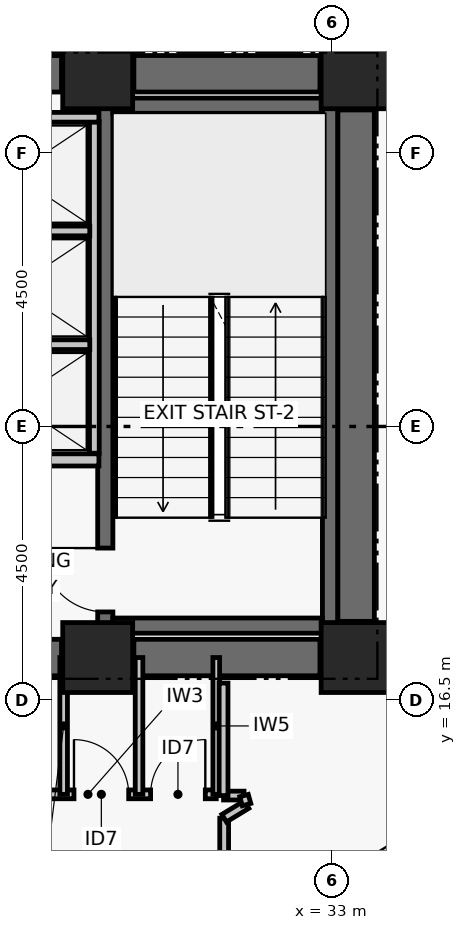
"""IFC4 building model, lengths in metres.
Left out: names, types, materials, properties, quantities, classifications, styles, units other than length and angle.
Written with IfcOpenShell. Run it as: python <this file> out.ifc"""

import sys

from ifc_helpers import new_model, si_unit, direction, frame, frame_2d, origin, origin_2d, place, context, subcontext, project, spatial, rectangle, extrude, element, fill, save


model = new_model("IFC4")
c1 = context("Model", 3, precision=1e-05, world=origin(), true_north=direction((0.0, 1.0)))
c2 = subcontext(c1, "Body", "Model", "MODEL_VIEW")
j1 = project(units=[si_unit("LENGTHUNIT", "METRE"), si_unit("PLANEANGLEUNIT", "RADIAN")], contexts=[c1])
p1 = place(None, origin())
s1 = spatial("IfcSite", under=j1, at=p1, CompositionType="ELEMENT")
p2 = place(p1, origin())
s2 = spatial("IfcBuilding", under=s1, at=p2, CompositionType="ELEMENT")
p3 = place(p2, frame((0.0, 0.0, 42.48)))
s3 = spatial("IfcBuildingStorey", under=s2, at=p3, CompositionType="ELEMENT", Elevation=42.48)
for number, where, z_axis, x_axis in (
    (1, (29.15, 17.2, 0.0), (0.0, 0.0, 1.0), (1.0, 0.0, 0.0)),
    (2, (33.4, 17.2, 0.0), (0.0, 0.0, 1.0), (1.0, 0.0, 0.0)),
    (3, (29.15, 26.8, 0.0), (0.0, 0.0, 1.0), (1.0, 0.0, 0.0)),
    (4, (33.4, 26.8, 0.0), (0.0, 0.0, 1.0), (1.0, 0.0, 0.0)),
):
    element("IfcColumn", number, at=place(p3, frame(where, z_axis=z_axis, x_axis=x_axis)), inside=s3, PredefinedType="COLUMN", context=c2, shape_type="SweptSolid", body=[
        extrude(rectangle(XDim=1.15, YDim=1.15, at=origin_2d()), origin(), (0.0, 0.0, 1.0), 3.72),
    ])
p4 = place(p3, frame((26.85, 17.2, 0.0), z_axis=(0.0, 0.0, 1.0), x_axis=(1.0, 0.0, 0.0)))
e5 = element("IfcWall", 5, at=p4, inside=s3, PredefinedType="SHEAR", context=c2, shape_type="SweptSolid", body=[
    extrude(rectangle(XDim=1.705, YDim=0.6, at=frame_2d((0.853, 0.0))), origin(), (0.0, 0.0, 1.0), 3.47),
])
p5 = place(p3, frame((29.745, 17.2, 0.0), z_axis=(0.0, 0.0, 1.0), x_axis=(1.0, 0.0, 0.0)))
e6 = element("IfcWall", 6, at=p5, inside=s3, PredefinedType="SHEAR", context=c2, shape_type="SweptSolid", body=[
    extrude(rectangle(XDim=3.06, YDim=0.6, at=frame_2d((1.53, 0.0))), origin(), (0.0, 0.0, 1.0), 3.47),
])
p6 = place(p3, frame((26.85, 26.8, 0.0), z_axis=(0.0, 0.0, 1.0), x_axis=(1.0, 0.0, 0.0)))
e7 = element("IfcWall", 7, at=p6, inside=s3, PredefinedType="SHEAR", context=c2, shape_type="SweptSolid", body=[
    extrude(rectangle(XDim=1.705, YDim=0.6, at=frame_2d((0.853, 0.0))), origin(), (0.0, 0.0, 1.0), 3.47),
])
p7 = place(p3, frame((29.745, 26.8, 0.0), z_axis=(0.0, 0.0, 1.0), x_axis=(1.0, 0.0, 0.0)))
e8 = element("IfcWall", 8, at=p7, inside=s3, PredefinedType="SHEAR", context=c2, shape_type="SweptSolid", body=[
    extrude(rectangle(XDim=3.06, YDim=0.6, at=frame_2d((1.53, 0.0))), origin(), (0.0, 0.0, 1.0), 3.47),
])
p8 = place(p3, frame((33.4, 17.795, 0.0), z_axis=(0.0, 0.0, 1.0), x_axis=(0.0, 1.0, 0.0)))
e9 = element("IfcWall", 9, at=p8, inside=s3, PredefinedType="SHEAR", context=c2, shape_type="SweptSolid", body=[
    extrude(rectangle(XDim=8.41, YDim=0.6, at=frame_2d((4.205, 0.0))), origin(), (0.0, 0.0, 1.0), 3.47),
])
p9 = place(p3, frame((29.275, 17.6, 0.0), z_axis=(0.0, 0.0, 1.0), x_axis=(0.0, 1.0, 0.0)))
e10 = element("IfcWall", 10, at=p9, inside=s3, PredefinedType="SHEAR", context=c2, shape_type="SweptSolid", body=[
    extrude(rectangle(XDim=8.8, YDim=0.25, at=frame_2d((4.4, 0.0))), origin(), (0.0, 0.0, 1.0), 3.47),
])
p10 = place(p9, frame((0.35, 0.0, 0.0)))
e11 = element("IfcOpeningElement", 11, at=p10, cuts=e10, PredefinedType="OPENING", context=c2, shape_type="SweptSolid", body=[
    extrude(rectangle(XDim=1.05, YDim=2.08, at=frame_2d((0.525, 1.04))), frame((0.0, 0.135, 0.0), z_axis=(0.0, -1.0, 0.0), x_axis=(1.0, 0.0, 0.0)), (0.0, 0.0, 1.0), 0.27),
])
p11 = place(p3, frame((32.971, 17.6, 0.0), z_axis=(0.0, 0.0, 1.0), x_axis=(0.0, 1.0, 0.0)))
e12 = element("IfcWall", 12, at=p11, inside=s3, PredefinedType="SHEAR", context=c2, shape_type="SweptSolid", body=[
    extrude(rectangle(XDim=8.8, YDim=0.25, at=frame_2d((4.4, 0.0))), origin(), (0.0, 0.0, 1.0), 3.47),
])
for number, where, z_axis, x_axis in (
    (13, (29.4, 17.725, 0.0), (0.0, 0.0, 1.0), (1.0, 0.0, 0.0)),
    (14, (29.4, 26.275, 0.0), (0.0, 0.0, 1.0), (1.0, 0.0, 0.0)),
):
    element("IfcWall", number, at=place(p3, frame(where, z_axis=z_axis, x_axis=x_axis)), inside=s3, PredefinedType="SHEAR", context=c2, shape_type="SweptSolid", body=[
        extrude(rectangle(XDim=3.446, YDim=0.25, at=frame_2d((1.723, 0.0))), origin(), (0.0, 0.0, 1.0), 3.47),
    ])
p12 = place(p3, frame((26.37, 20.45, 0.0), z_axis=(0.0, 0.0, 1.0), x_axis=(1.0, 0.0, 0.0)))
e15 = element("IfcWall", 15, at=p12, inside=s3, PredefinedType="PARTITIONING", context=c2, shape_type="SweptSolid", body=[
    extrude(rectangle(XDim=2.8, YDim=0.2, at=frame_2d((1.4, 0.0))), origin(), (0.0, 0.0, 1.0), 3.47),
])
p13 = place(p12, frame((0.78, 0.0, 0.0)))
e16 = element("IfcOpeningElement", 16, at=p13, cuts=e15, PredefinedType="OPENING", context=c2, shape_type="SweptSolid", body=[
    extrude(rectangle(XDim=1.1, YDim=2.08, at=frame_2d((0.55, 1.04))), frame((0.0, 0.11, 0.0), z_axis=(0.0, -1.0, 0.0), x_axis=(1.0, 0.0, 0.0)), (0.0, 0.0, 1.0), 0.22),
])
p14 = place(p3, frame((29.095, 20.56, 0.0), z_axis=(0.0, 0.0, 1.0), x_axis=(0.0, 1.0, 0.0)))
e17 = element("IfcWall", 17, at=p14, inside=s3, PredefinedType="PARTITIONING", context=c2, shape_type="SweptSolid", body=[
    extrude(rectangle(XDim=5.45, YDim=0.16, at=frame_2d((2.725, 0.0))), origin(), (0.0, 0.0, 1.0), 3.47),
])
p15 = place(p3, frame((26.37, 22.345, 0.0), z_axis=(0.0, 0.0, 1.0), x_axis=(1.0, 0.0, 0.0)))
e18 = element("IfcWall", 18, at=p15, inside=s3, PredefinedType="PARTITIONING", context=c2, shape_type="SweptSolid", body=[
    extrude(rectangle(XDim=2.65, YDim=0.16, at=frame_2d((1.325, 0.0))), origin(), (0.0, 0.0, 1.0), 3.47),
])
p16 = place(p3, frame((26.53, 24.215, 0.0), z_axis=(0.0, 0.0, 1.0), x_axis=(1.0, 0.0, 0.0)))
e19 = element("IfcWall", 19, at=p16, inside=s3, PredefinedType="PARTITIONING", context=c2, shape_type="SweptSolid", body=[
    extrude(rectangle(XDim=2.49, YDim=0.16, at=frame_2d((1.245, 0.0))), origin(), (0.0, 0.0, 1.0), 3.47),
])
p17 = place(p3, frame((26.34, 26.085, 0.0), z_axis=(0.0, 0.0, 1.0), x_axis=(1.0, 0.0, 0.0)))
e20 = element("IfcWall", 20, at=p17, inside=s3, PredefinedType="PARTITIONING", context=c2, shape_type="SweptSolid", body=[
    extrude(rectangle(XDim=2.83, YDim=0.16, at=frame_2d((1.415, 0.0))), origin(), (0.0, 0.0, 1.0), 3.47),
])
p18 = place(p3, frame((26.88, 14.95, 0.0), z_axis=(0.0, 0.0, 1.0), x_axis=(1.0, 0.0, 0.0)))
e21 = element("IfcWall", 21, at=p18, inside=s3, PredefinedType="PARTITIONING", context=c2, shape_type="SweptSolid", body=[
    extrude(rectangle(XDim=4.22, YDim=0.145, at=frame_2d((2.11, 0.0))), origin(), (0.0, 0.0, 1.0), 3.0),
])
p19 = place(p18, frame((0.39, 0.0, 0.0)))
e22 = element("IfcOpeningElement", 22, at=p19, cuts=e21, PredefinedType="OPENING", context=c2, shape_type="SweptSolid", body=[
    extrude(rectangle(XDim=0.92, YDim=2.05, at=frame_2d((0.46, 1.025))), frame((0.0, 0.083, 0.0), z_axis=(0.0, -1.0, 0.0), x_axis=(1.0, 0.0, 0.0)), (0.0, 0.0, 1.0), 0.165),
])
p20 = place(p18, frame((1.88, 0.0, 0.0)))
e23 = element("IfcOpeningElement", 23, at=p20, cuts=e21, PredefinedType="OPENING", context=c2, shape_type="SweptSolid", body=[
    extrude(rectangle(XDim=0.9, YDim=2.02, at=frame_2d((0.45, 1.01))), frame((0.0, 0.083, 0.0), z_axis=(0.0, -1.0, 0.0), x_axis=(1.0, 0.0, 0.0)), (0.0, 0.0, 1.0), 0.165),
])
p21 = place(p18, frame((3.14, 0.0, 0.0)))
e24 = element("IfcOpeningElement", 24, at=p21, cuts=e21, PredefinedType="OPENING", context=c2, shape_type="SweptSolid", body=[
    extrude(rectangle(XDim=0.9, YDim=2.02, at=frame_2d((0.45, 1.01))), frame((0.0, 0.083, 0.0), z_axis=(0.0, -1.0, 0.0), x_axis=(1.0, 0.0, 0.0)), (0.0, 0.0, 1.0), 0.165),
])
for number, where, z_axis, x_axis in (
    (25, (28.59, 14.95, 0.0), (0.0, 0.0, 1.0), (0.0, 1.0, 0.0)),
    (26, (29.83, 14.95, 0.0), (0.0, 0.0, 1.0), (0.0, 1.0, 0.0)),
):
    element("IfcWall", number, at=place(p3, frame(where, z_axis=z_axis, x_axis=x_axis)), inside=s3, PredefinedType="PARTITIONING", context=c2, shape_type="SweptSolid", body=[
        extrude(rectangle(XDim=2.25, YDim=0.125, at=frame_2d((1.125, 0.0))), origin(), (0.0, 0.0, 1.0), 2.6),
    ])
p22 = place(p3, frame((31.1, 14.95, 0.0), z_axis=(0.0, 0.0, 1.0), x_axis=(0.0, 1.0, 0.0)))
e27 = element("IfcWall", 27, at=p22, inside=s3, PredefinedType="PARTITIONING", context=c2, shape_type="SweptSolid", body=[
    extrude(rectangle(XDim=2.25, YDim=0.11, at=frame_2d((1.125, 0.0))), origin(), (0.0, 0.0, 1.0), 2.6),
])
p23 = place(p3, frame((31.23, 13.29, 0.0), z_axis=(0.0, 0.0, 1.0), x_axis=(0.0, 1.0, 0.0)))
e28 = element("IfcWall", 28, at=p23, inside=s3, PredefinedType="PARTITIONING", context=c2, shape_type="SweptSolid", body=[
    extrude(rectangle(XDim=1.268, YDim=0.145, at=frame_2d((0.634, 0.0))), origin(), (0.0, 0.0, 1.0), 2.85),
])
p24 = place(p3, frame((31.23, 14.558, 0.0), z_axis=(0.0, 0.0, 1.0), x_axis=(0.854931196424, 0.518741408971, 0.0)))
e29 = element("IfcWall", 29, at=p24, inside=s3, PredefinedType="PARTITIONING", context=c2, shape_type="SweptSolid", body=[
    extrude(rectangle(XDim=0.431, YDim=0.145, at=frame_2d((0.215, 0.0))), origin(), (0.0, 0.0, 1.0), 3.0),
])
p25 = place(p3, frame((31.557, 14.93, 0.0), z_axis=(0.0, 0.0, 1.0), x_axis=(-1.0, 0.0, 0.0)))
e30 = element("IfcWall", 30, at=p25, inside=s3, PredefinedType="PARTITIONING", context=c2, shape_type="SweptSolid", body=[
    extrude(rectangle(XDim=0.337, YDim=0.145, at=frame_2d((0.168, 0.0))), origin(), (0.0, 0.0, 1.0), 3.0),
])
p26 = place(p3, frame((31.22, 14.93, 0.0), z_axis=(0.0, 0.0, 1.0), x_axis=(0.0, 1.0, 0.0)))
e31 = element("IfcWall", 31, at=p26, inside=s3, PredefinedType="PARTITIONING", context=c2, shape_type="SweptSolid", body=[
    extrude(rectangle(XDim=1.85, YDim=0.145, at=frame_2d((0.925, 0.0))), origin(), (0.0, 0.0, 1.0), 2.6),
])
p27 = place(p3, frame((33.74, 27.22, 0.0), z_axis=(0.0, 0.0, 1.0), x_axis=(-1.0, 0.0, 0.0)))
e32 = element("IfcWall", 32, at=p27, inside=s3, PredefinedType="PARTITIONING", context=c2, shape_type="SweptSolid", body=[
    extrude(rectangle(XDim=0.86, YDim=0.145, at=frame_2d((0.43, 0.0))), origin(), (0.0, 0.0, 1.0), 2.6),
])
p28 = place(p3, frame((31.598, 14.781, 0.0), z_axis=(0.0, 0.0, 1.0), x_axis=(-0.269277388617, 0.963062660464, 0.0)))
e33 = element("IfcWall", 33, at=p28, inside=s3, PredefinedType="PARTITIONING", context=c2, shape_type="SweptSolid", body=[
    extrude(rectangle(XDim=0.154, YDim=0.145, at=frame_2d((0.077, 0.0))), origin(), (0.0, 0.0, 1.0), 3.0),
])
p29 = place(p10, origin())
e34 = element("IfcDoor", 34, at=p29, inside=s3, OperationType="SINGLE_SWING_RIGHT", PredefinedType="DOOR", context=c2, shape_type="SweptSolid", body=[
    extrude(rectangle(XDim=1.05, YDim=2.08, at=frame_2d((0.525, 1.04))), frame((0.0, 0.025, 0.0), z_axis=(0.0, -1.0, 0.0), x_axis=(1.0, 0.0, 0.0)), (0.0, 0.0, 1.0), 0.05),
])
fill(e11, e34)
p30 = place(p20, origin())
e35 = element("IfcDoor", 35, at=p30, inside=s3, OperationType="SINGLE_SWING_LEFT", PredefinedType="DOOR", context=c2, shape_type="SweptSolid", body=[
    extrude(rectangle(XDim=0.9, YDim=2.02, at=frame_2d((0.45, 1.01))), frame((0.0, 0.025, 0.0), z_axis=(0.0, -1.0, 0.0), x_axis=(1.0, 0.0, 0.0)), (0.0, 0.0, 1.0), 0.05),
])
fill(e23, e35)
p31 = place(p21, origin())
e36 = element("IfcDoor", 36, at=p31, inside=s3, OperationType="SINGLE_SWING_RIGHT", PredefinedType="DOOR", context=c2, shape_type="SweptSolid", body=[
    extrude(rectangle(XDim=0.9, YDim=2.02, at=frame_2d((0.45, 1.01))), frame((0.0, 0.025, 0.0), z_axis=(0.0, -1.0, 0.0), x_axis=(1.0, 0.0, 0.0)), (0.0, 0.0, 1.0), 0.05),
])
fill(e24, e36)
save(model, sys.argv[1])
